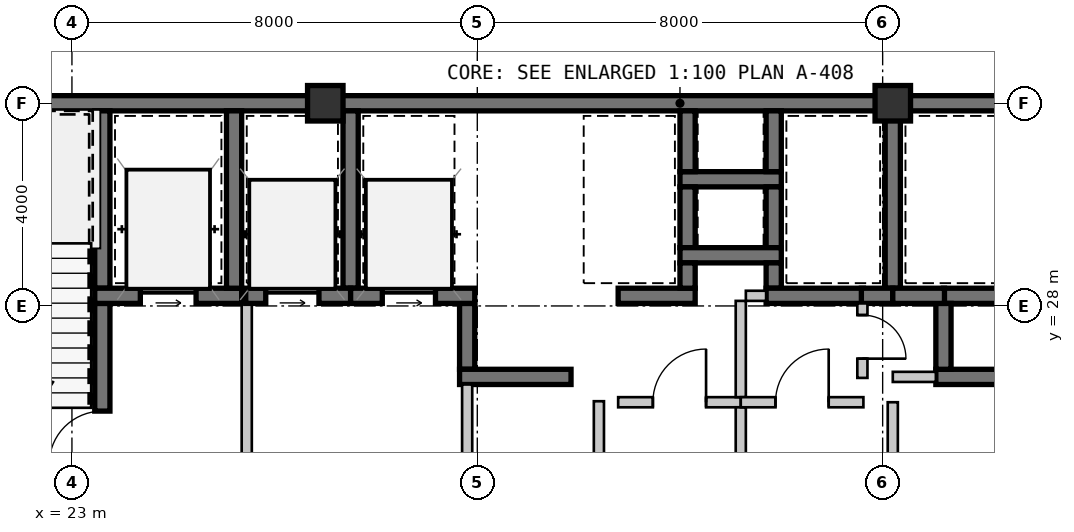
"""IFC4 building model, lengths in metres.
Left out: names, types, materials, properties, quantities, classifications, styles, units other than length and angle.
Written with IfcOpenShell. Run it as: python <this file> out.ifc"""

import sys

from ifc_helpers import new_model, si_unit, direction, frame, frame_2d, origin, origin_2d, place, context, subcontext, project, spatial, rectangle, extrude, source, transform, mapped, element, fill, save


model = new_model("IFC4")
c1 = context("Model", 3, precision=1e-05, world=origin(), true_north=direction((0.0, 1.0)))
c2 = subcontext(c1, "Body", "Model", "MODEL_VIEW")
j1 = project(units=[si_unit("LENGTHUNIT", "METRE"), si_unit("PLANEANGLEUNIT", "RADIAN")], contexts=[c1])
p1 = place(None, origin())
s1 = spatial("IfcSite", under=j1, at=p1, CompositionType="ELEMENT")
p2 = place(p1, origin())
s2 = spatial("IfcBuilding", under=s1, at=p2, CompositionType="ELEMENT")
p3 = place(p2, frame((0.0, 0.0, 65.1)))
s3 = spatial("IfcBuildingStorey", under=s2, at=p3, CompositionType="ELEMENT", Elevation=65.1)
m1 = source(origin(), c2, "Body", "SweptSolid", [
    extrude(rectangle(XDim=0.7, YDim=0.7, at=origin_2d()), origin(), (0.0, 0.0, 1.0), 3.15),
])
for number, where, z_axis, x_axis in (
    (1, (28.0, 32.0, 0.0), (0.0, 0.0, 1.0), (1.0, 0.0, 0.0)),
    (2, (39.2, 32.0, 0.0), (0.0, 0.0, 1.0), (1.0, 0.0, 0.0)),
):
    element("IfcColumn", number, at=place(p3, frame(where, z_axis=z_axis, x_axis=x_axis)), inside=s3, PredefinedType="COLUMN", context=c2, shape_type="MappedRepresentation", body=[
        mapped(m1, transform((0.0, 0.0, 0.0), scale=1.0)),
    ])
m2 = source(origin(), c2, "Body", "SweptSolid", [
    extrude(rectangle(XDim=9.15, YDim=0.3, at=frame_2d((4.575, 0.0))), origin(), (0.0, 0.0, 1.0), 2.93),
])
p4 = place(p3, frame((18.85, 32.0, 0.0), z_axis=(0.0, 0.0, 1.0), x_axis=(1.0, 0.0, 0.0)))
e3 = element("IfcWall", 3, at=p4, inside=s3, PredefinedType="SHEAR", context=c2, shape_type="MappedRepresentation", body=[
    mapped(m2, transform((0.0, 0.0, 0.0), scale=1.0)),
])
m3 = source(origin(), c2, "Body", "SweptSolid", [
    extrude(rectangle(XDim=11.2, YDim=0.3, at=frame_2d((5.6, 0.0))), origin(), (0.0, 0.0, 1.0), 2.93),
])
p5 = place(p3, frame((28.0, 32.0, 0.0), z_axis=(0.0, 0.0, 1.0), x_axis=(1.0, 0.0, 0.0)))
e4 = element("IfcWall", 4, at=p5, inside=s3, PredefinedType="SHEAR", context=c2, shape_type="MappedRepresentation", body=[
    mapped(m3, transform((0.0, 0.0, 0.0), scale=1.0)),
])
m4 = source(origin(), c2, "Body", "SweptSolid", [
    extrude(rectangle(XDim=11.95, YDim=0.3, at=frame_2d((5.975, 0.0))), origin(), (0.0, 0.0, 1.0), 2.93),
])
p6 = place(p3, frame((39.2, 32.0, 0.0), z_axis=(0.0, 0.0, 1.0), x_axis=(1.0, 0.0, 0.0)))
e5 = element("IfcWall", 5, at=p6, inside=s3, PredefinedType="SHEAR", context=c2, shape_type="MappedRepresentation", body=[
    mapped(m4, transform((0.0, 0.0, 0.0), scale=1.0)),
])
m5 = source(origin(), c2, "Body", "SweptSolid", [
    extrude(rectangle(XDim=3.5, YDim=0.3, at=frame_2d((1.75, 0.0))), origin(), (0.0, 0.0, 1.0), 2.93),
])
p7 = place(p3, frame((23.6, 28.35, 0.0), z_axis=(0.0, 0.0, 1.0), x_axis=(0.0, 1.0, 0.0)))
e6 = element("IfcWall", 6, at=p7, inside=s3, PredefinedType="SHEAR", context=c2, shape_type="MappedRepresentation", body=[
    mapped(m5, transform((0.0, 0.0, 0.0), scale=1.0)),
])
m6 = source(origin(), c2, "Body", "SweptSolid", [
    extrude(rectangle(XDim=3.9, YDim=0.3, at=frame_2d((1.95, 0.0))), origin(), (0.0, 0.0, 1.0), 2.93),
])
p8 = place(p3, frame((23.6, 24.15, 0.0), z_axis=(0.0, 0.0, 1.0), x_axis=(0.0, 1.0, 0.0)))
e7 = element("IfcWall", 7, at=p8, inside=s3, PredefinedType="SHEAR", context=c2, shape_type="MappedRepresentation", body=[
    mapped(m6, transform((0.0, 0.0, 0.0), scale=1.0)),
])
m7 = source(origin(), c2, "Body", "SweptSolid", [
    extrude(rectangle(XDim=1.05, YDim=2.1, at=frame_2d((0.525, 1.05))), frame((0.0, 0.16, 0.0), z_axis=(0.0, -1.0, 0.0), x_axis=(1.0, 0.0, 0.0)), (0.0, 0.0, 1.0), 0.32),
])
p9 = place(p8, frame((0.725, 0.0, 0.0)))
e8 = element("IfcOpeningElement", 8, at=p9, cuts=e7, PredefinedType="OPENING", context=c2, shape_type="MappedRepresentation", body=[
    mapped(m7, transform((0.0, 0.0, 0.0), scale=1.0)),
])
m8 = source(origin(), c2, "Body", "SweptSolid", [
    extrude(rectangle(XDim=2.9, YDim=0.3, at=frame_2d((1.45, 0.0))), origin(), (0.0, 0.0, 1.0), 2.93),
])
p10 = place(p3, frame((23.45, 28.2, 0.0), z_axis=(0.0, 0.0, 1.0), x_axis=(1.0, 0.0, 0.0)))
e9 = element("IfcWall", 9, at=p10, inside=s3, PredefinedType="SHEAR", context=c2, shape_type="MappedRepresentation", body=[
    mapped(m8, transform((0.0, 0.0, 0.0), scale=1.0)),
])
m9 = source(origin(), c2, "Body", "SweptSolid", [
    extrude(rectangle(XDim=1.1, YDim=2.15, at=frame_2d((0.55, 1.075))), frame((0.0, 0.16, 0.0), z_axis=(0.0, -1.0, 0.0), x_axis=(1.0, 0.0, 0.0)), (0.0, 0.0, 1.0), 0.32),
])
p11 = place(p10, frame((0.9, 0.0, 0.0)))
e10 = element("IfcOpeningElement", 10, at=p11, cuts=e9, PredefinedType="OPENING", context=c2, shape_type="MappedRepresentation", body=[
    mapped(m9, transform((0.0, 0.0, 0.0), scale=1.0)),
])
p12 = place(p3, frame((26.2, 28.35, 0.0), z_axis=(0.0, 0.0, 1.0), x_axis=(0.0, 1.0, 0.0)))
e11 = element("IfcWall", 11, at=p12, inside=s3, PredefinedType="SHEAR", context=c2, shape_type="MappedRepresentation", body=[
    mapped(m5, transform((0.0, 0.0, 0.0), scale=1.0)),
])
m10 = source(origin(), c2, "Body", "SweptSolid", [
    extrude(rectangle(XDim=3.95, YDim=0.2, at=frame_2d((1.975, 0.0))), origin(), (0.0, 0.0, 1.0), 2.93),
])
p13 = place(p3, frame((26.45, 24.1, 0.0), z_axis=(0.0, 0.0, 1.0), x_axis=(0.0, 1.0, 0.0)))
e12 = element("IfcWall", 12, at=p13, inside=s3, PredefinedType="SOLIDWALL", context=c2, shape_type="MappedRepresentation", body=[
    mapped(m10, transform((0.0, 0.0, 0.0), scale=1.0)),
])
m11 = source(origin(), c2, "Body", "SweptSolid", [
    extrude(rectangle(XDim=2.0, YDim=0.3, at=frame_2d((1.0, 0.0))), origin(), (0.0, 0.0, 1.0), 2.93),
])
p14 = place(p3, frame((35.0, 30.5, 0.0), z_axis=(0.0, 0.0, 1.0), x_axis=(1.0, 0.0, 0.0)))
e13 = element("IfcWall", 13, at=p14, inside=s3, PredefinedType="SHEAR", context=c2, shape_type="MappedRepresentation", body=[
    mapped(m11, transform((0.0, 0.0, 0.0), scale=1.0)),
])
m12 = source(origin(), c2, "Body", "SweptSolid", [
    extrude(rectangle(XDim=1.2, YDim=0.3, at=frame_2d((0.6, 0.0))), origin(), (0.0, 0.0, 1.0), 2.93),
])
for number, where, z_axis, x_axis in (
    (14, (35.15, 31.85, 0.0), (0.0, 0.0, 1.0), (0.0, -1.0, 0.0)),
    (15, (36.85, 30.65, 0.0), (0.0, 0.0, 1.0), (0.0, 1.0, 0.0)),
    (16, (35.15, 30.35, 0.0), (0.0, 0.0, 1.0), (0.0, -1.0, 0.0)),
    (17, (36.85, 29.15, 0.0), (0.0, 0.0, 1.0), (0.0, 1.0, 0.0)),
):
    element("IfcWall", number, at=place(p3, frame(where, z_axis=z_axis, x_axis=x_axis)), inside=s3, PredefinedType="SHEAR", context=c2, shape_type="MappedRepresentation", body=[
        mapped(m12, transform((0.0, 0.0, 0.0), scale=1.0)),
    ])
p15 = place(p3, frame((35.0, 29.0, 0.0), z_axis=(0.0, 0.0, 1.0), x_axis=(1.0, 0.0, 0.0)))
e18 = element("IfcWall", 18, at=p15, inside=s3, PredefinedType="SHEAR", context=c2, shape_type="MappedRepresentation", body=[
    mapped(m11, transform((0.0, 0.0, 0.0), scale=1.0)),
])
m13 = source(origin(), c2, "Body", "SweptSolid", [
    extrude(rectangle(XDim=1.3, YDim=0.3, at=frame_2d((0.65, 0.0))), origin(), (0.0, 0.0, 1.0), 2.93),
])
p16 = place(p3, frame((30.8, 28.05, 0.0), z_axis=(0.0, 0.0, 1.0), x_axis=(0.0, -1.0, 0.0)))
e19 = element("IfcWall", 19, at=p16, inside=s3, PredefinedType="SHEAR", context=c2, shape_type="MappedRepresentation", body=[
    mapped(m13, transform((0.0, 0.0, 0.0), scale=1.0)),
])
m14 = source(origin(), c2, "Body", "SweptSolid", [
    extrude(rectangle(XDim=2.2, YDim=0.3, at=frame_2d((1.1, 0.0))), origin(), (0.0, 0.0, 1.0), 2.93),
])
p17 = place(p3, frame((30.65, 26.6, 0.0), z_axis=(0.0, 0.0, 1.0), x_axis=(1.0, 0.0, 0.0)))
e20 = element("IfcWall", 20, at=p17, inside=s3, PredefinedType="SHEAR", context=c2, shape_type="MappedRepresentation", body=[
    mapped(m14, transform((0.0, 0.0, 0.0), scale=1.0)),
])
m15 = source(origin(), c2, "Body", "SweptSolid", [
    extrude(rectangle(XDim=1.32, YDim=0.3, at=frame_2d((0.66, 0.0))), origin(), (0.0, 0.0, 1.0), 2.93),
])
p18 = place(p3, frame((41.52, 28.2, 0.0), z_axis=(0.0, 0.0, 1.0), x_axis=(-1.0, 0.0, 0.0)))
e21 = element("IfcWall", 21, at=p18, inside=s3, PredefinedType="SHEAR", context=c2, shape_type="MappedRepresentation", body=[
    mapped(m15, transform((0.0, 0.0, 0.0), scale=1.0)),
])
m16 = source(origin(), c2, "Body", "SweptSolid", [
    extrude(rectangle(XDim=1.47, YDim=0.3, at=frame_2d((0.735, 0.0))), origin(), (0.0, 0.0, 1.0), 2.93),
])
p19 = place(p3, frame((40.05, 26.6, 0.0), z_axis=(0.0, 0.0, 1.0), x_axis=(1.0, 0.0, 0.0)))
e22 = element("IfcWall", 22, at=p19, inside=s3, PredefinedType="SHEAR", context=c2, shape_type="MappedRepresentation", body=[
    mapped(m16, transform((0.0, 0.0, 0.0), scale=1.0)),
])
p20 = place(p3, frame((40.2, 28.05, 0.0), z_axis=(0.0, 0.0, 1.0), x_axis=(0.0, -1.0, 0.0)))
e23 = element("IfcWall", 23, at=p20, inside=s3, PredefinedType="SHEAR", context=c2, shape_type="MappedRepresentation", body=[
    mapped(m13, transform((0.0, 0.0, 0.0), scale=1.0)),
])
p21 = place(p3, frame((28.5, 28.35, 0.0), z_axis=(0.0, 0.0, 1.0), x_axis=(0.0, 1.0, 0.0)))
e24 = element("IfcWall", 24, at=p21, inside=s3, PredefinedType="SHEAR", context=c2, shape_type="MappedRepresentation", body=[
    mapped(m5, transform((0.0, 0.0, 0.0), scale=1.0)),
])
m17 = source(origin(), c2, "Body", "SweptSolid", [
    extrude(rectangle(XDim=2.07, YDim=0.3, at=frame_2d((1.035, 0.0))), origin(), (0.0, 0.0, 1.0), 2.93),
])
p22 = place(p3, frame((26.43, 28.2, 0.0), z_axis=(0.0, 0.0, 1.0), x_axis=(1.0, 0.0, 0.0)))
e25 = element("IfcWall", 25, at=p22, inside=s3, PredefinedType="SHEAR", context=c2, shape_type="MappedRepresentation", body=[
    mapped(m17, transform((0.0, 0.0, 0.0), scale=1.0)),
])
m18 = source(origin(), c2, "Body", "SweptSolid", [
    extrude(rectangle(XDim=1.05, YDim=2.15, at=frame_2d((0.525, 1.075))), frame((0.0, 0.16, 0.0), z_axis=(0.0, -1.0, 0.0), x_axis=(1.0, 0.0, 0.0)), (0.0, 0.0, 1.0), 0.32),
])
p23 = place(p22, frame((0.395, 0.0, 0.0)))
e26 = element("IfcOpeningElement", 26, at=p23, cuts=e25, PredefinedType="OPENING", context=c2, shape_type="MappedRepresentation", body=[
    mapped(m18, transform((0.0, 0.0, 0.0), scale=1.0)),
])
m19 = source(origin(), c2, "Body", "SweptSolid", [
    extrude(rectangle(XDim=2.45, YDim=0.3, at=frame_2d((1.225, 0.0))), origin(), (0.0, 0.0, 1.0), 2.93),
])
p24 = place(p3, frame((28.5, 28.2, 0.0), z_axis=(0.0, 0.0, 1.0), x_axis=(1.0, 0.0, 0.0)))
e27 = element("IfcWall", 27, at=p24, inside=s3, PredefinedType="SHEAR", context=c2, shape_type="MappedRepresentation", body=[
    mapped(m19, transform((0.0, 0.0, 0.0), scale=1.0)),
])
p25 = place(p24, frame((0.625, 0.0, 0.0)))
e28 = element("IfcOpeningElement", 28, at=p25, cuts=e27, PredefinedType="OPENING", context=c2, shape_type="MappedRepresentation", body=[
    mapped(m18, transform((0.0, 0.0, 0.0), scale=1.0)),
])
m20 = source(origin(), c2, "Body", "SweptSolid", [
    extrude(rectangle(XDim=2.35, YDim=0.2, at=frame_2d((1.175, 0.0))), origin(), (0.0, 0.0, 1.0), 2.93),
])
p26 = place(p3, frame((30.8, 26.45, 0.0), z_axis=(0.0, 0.0, 1.0), x_axis=(0.0, -1.0, 0.0)))
e29 = element("IfcWall", 29, at=p26, inside=s3, PredefinedType="SOLIDWALL", context=c2, shape_type="MappedRepresentation", body=[
    mapped(m20, transform((0.0, 0.0, 0.0), scale=1.0)),
])
m21 = source(origin(), c2, "Body", "SweptSolid", [
    extrude(rectangle(XDim=1.52, YDim=0.3, at=frame_2d((0.76, 0.0))), origin(), (0.0, 0.0, 1.0), 2.93),
])
p27 = place(p3, frame((33.78, 28.2, 0.0), z_axis=(0.0, 0.0, 1.0), x_axis=(1.0, 0.0, 0.0)))
e30 = element("IfcWall", 30, at=p27, inside=s3, PredefinedType="SHEAR", context=c2, shape_type="MappedRepresentation", body=[
    mapped(m21, transform((0.0, 0.0, 0.0), scale=1.0)),
])
m22 = source(origin(), c2, "Body", "SweptSolid", [
    extrude(rectangle(XDim=0.5, YDim=0.3, at=frame_2d((0.25, 0.0))), origin(), (0.0, 0.0, 1.0), 2.93),
])
p28 = place(p3, frame((35.15, 28.35, 0.0), z_axis=(0.0, 0.0, 1.0), x_axis=(0.0, 1.0, 0.0)))
e31 = element("IfcWall", 31, at=p28, inside=s3, PredefinedType="SHEAR", context=c2, shape_type="MappedRepresentation", body=[
    mapped(m22, transform((0.0, 0.0, 0.0), scale=1.0)),
])
p29 = place(p3, frame((39.2, 28.35, 0.0), z_axis=(0.0, 0.0, 1.0), x_axis=(0.0, 1.0, 0.0)))
e32 = element("IfcWall", 32, at=p29, inside=s3, PredefinedType="SHEAR", context=c2, shape_type="MappedRepresentation", body=[
    mapped(m5, transform((0.0, 0.0, 0.0), scale=1.0)),
])
p30 = place(p3, frame((36.85, 28.85, 0.0), z_axis=(0.0, 0.0, 1.0), x_axis=(0.0, -1.0, 0.0)))
e33 = element("IfcWall", 33, at=p30, inside=s3, PredefinedType="SHEAR", context=c2, shape_type="MappedRepresentation", body=[
    mapped(m22, transform((0.0, 0.0, 0.0), scale=1.0)),
])
m23 = source(origin(), c2, "Body", "SweptSolid", [
    extrude(rectangle(XDim=1.92, YDim=0.3, at=frame_2d((0.96, 0.0))), origin(), (0.0, 0.0, 1.0), 2.93),
])
p31 = place(p3, frame((36.7, 28.2, 0.0), z_axis=(0.0, 0.0, 1.0), x_axis=(1.0, 0.0, 0.0)))
e34 = element("IfcWall", 34, at=p31, inside=s3, PredefinedType="SHEAR", context=c2, shape_type="MappedRepresentation", body=[
    mapped(m23, transform((0.0, 0.0, 0.0), scale=1.0)),
])
m24 = source(origin(), c2, "Body", "SweptSolid", [
    extrude(rectangle(XDim=0.62, YDim=0.3, at=frame_2d((0.31, 0.0))), origin(), (0.0, 0.0, 1.0), 2.93),
])
p32 = place(p3, frame((38.58, 28.2, 0.0), z_axis=(0.0, 0.0, 1.0), x_axis=(1.0, 0.0, 0.0)))
e35 = element("IfcWall", 35, at=p32, inside=s3, PredefinedType="SHEAR", context=c2, shape_type="MappedRepresentation", body=[
    mapped(m24, transform((0.0, 0.0, 0.0), scale=1.0)),
])
m25 = source(origin(), c2, "Body", "SweptSolid", [
    extrude(rectangle(XDim=1.02, YDim=0.3, at=frame_2d((0.51, 0.0))), origin(), (0.0, 0.0, 1.0), 2.93),
])
p33 = place(p3, frame((39.2, 28.2, 0.0), z_axis=(0.0, 0.0, 1.0), x_axis=(1.0, 0.0, 0.0)))
e36 = element("IfcWall", 36, at=p33, inside=s3, PredefinedType="SHEAR", context=c2, shape_type="MappedRepresentation", body=[
    mapped(m25, transform((0.0, 0.0, 0.0), scale=1.0)),
])
m26 = source(origin(), c2, "Body", "SweptSolid", [
    extrude(rectangle(XDim=2.02, YDim=0.2, at=frame_2d((1.01, 0.0))), origin(), (0.0, 0.0, 1.0), 2.93),
])
p34 = place(p3, frame((33.4, 26.12, 0.0), z_axis=(0.0, 0.0, 1.0), x_axis=(0.0, -1.0, 0.0)))
e37 = element("IfcWall", 37, at=p34, inside=s3, PredefinedType="SOLIDWALL", context=c2, shape_type="MappedRepresentation", body=[
    mapped(m26, transform((0.0, 0.0, 0.0), scale=1.0)),
])
m27 = source(origin(), c2, "Body", "SweptSolid", [
    extrude(rectangle(XDim=2.42, YDim=0.2, at=frame_2d((1.21, 0.0))), origin(), (0.0, 0.0, 1.0), 2.93),
])
p35 = place(p3, frame((33.78, 26.1, 0.0), z_axis=(0.0, 0.0, 1.0), x_axis=(1.0, 0.0, 0.0)))
e38 = element("IfcWall", 38, at=p35, inside=s3, PredefinedType="SOLIDWALL", context=c2, shape_type="MappedRepresentation", body=[
    mapped(m27, transform((0.0, 0.0, 0.0), scale=1.0)),
])
m28 = source(origin(), c2, "Body", "SweptSolid", [
    extrude(rectangle(XDim=1.05, YDim=2.1, at=frame_2d((0.525, 1.05))), frame((0.0, 0.11, 0.0), z_axis=(0.0, -1.0, 0.0), x_axis=(1.0, 0.0, 0.0)), (0.0, 0.0, 1.0), 0.22),
])
p36 = place(p35, frame((0.685, 0.0, 0.0)))
e39 = element("IfcOpeningElement", 39, at=p36, cuts=e38, PredefinedType="OPENING", context=c2, shape_type="MappedRepresentation", body=[
    mapped(m28, transform((0.0, 0.0, 0.0), scale=1.0)),
])
m29 = source(origin(), c2, "Body", "SweptSolid", [
    extrude(rectangle(XDim=1.9, YDim=0.2, at=frame_2d((0.95, 0.0))), origin(), (0.0, 0.0, 1.0), 2.93),
])
p37 = place(p3, frame((36.2, 26.0, 0.0), z_axis=(0.0, 0.0, 1.0), x_axis=(0.0, -1.0, 0.0)))
e40 = element("IfcWall", 40, at=p37, inside=s3, PredefinedType="SOLIDWALL", context=c2, shape_type="MappedRepresentation", body=[
    mapped(m29, transform((0.0, 0.0, 0.0), scale=1.0)),
])
m30 = source(origin(), c2, "Body", "SweptSolid", [
    extrude(rectangle(XDim=1.9, YDim=0.2, at=frame_2d((0.95, 0.0))), origin(), (0.0, 0.0, 1.0), 2.93),
])
p38 = place(p3, frame((36.2, 28.1, 0.0), z_axis=(0.0, 0.0, 1.0), x_axis=(0.0, -1.0, 0.0)))
e41 = element("IfcWall", 41, at=p38, inside=s3, PredefinedType="SOLIDWALL", context=c2, shape_type="MappedRepresentation", body=[
    mapped(m30, transform((0.0, 0.0, 0.0), scale=1.0)),
])
m31 = source(origin(), c2, "Body", "SweptSolid", [
    extrude(rectangle(XDim=0.4, YDim=0.2, at=frame_2d((0.2, 0.0))), origin(), (0.0, 0.0, 1.0), 2.93),
])
p39 = place(p3, frame((36.7, 28.2, 0.0), z_axis=(0.0, 0.0, 1.0), x_axis=(-1.0, 0.0, 0.0)))
e42 = element("IfcWall", 42, at=p39, inside=s3, PredefinedType="SOLIDWALL", context=c2, shape_type="MappedRepresentation", body=[
    mapped(m31, transform((0.0, 0.0, 0.0), scale=1.0)),
])
m32 = source(origin(), c2, "Body", "SweptSolid", [
    extrude(rectangle(XDim=2.42, YDim=0.2, at=frame_2d((1.21, 0.0))), origin(), (0.0, 0.0, 1.0), 2.93),
])
p40 = place(p3, frame((36.2, 26.1, 0.0), z_axis=(0.0, 0.0, 1.0), x_axis=(1.0, 0.0, 0.0)))
e43 = element("IfcWall", 43, at=p40, inside=s3, PredefinedType="SOLIDWALL", context=c2, shape_type="MappedRepresentation", body=[
    mapped(m32, transform((0.0, 0.0, 0.0), scale=1.0)),
])
p41 = place(p40, frame((0.685, 0.0, 0.0)))
e44 = element("IfcOpeningElement", 44, at=p41, cuts=e43, PredefinedType="OPENING", context=c2, shape_type="MappedRepresentation", body=[
    mapped(m28, transform((0.0, 0.0, 0.0), scale=1.0)),
])
m33 = source(origin(), c2, "Body", "SweptSolid", [
    extrude(rectangle(XDim=2.0, YDim=0.2, at=frame_2d((1.0, 0.0))), origin(), (0.0, 0.0, 1.0), 2.47),
])
p42 = place(p3, frame((39.2, 26.1, 0.0), z_axis=(0.0, 0.0, 1.0), x_axis=(0.0, -1.0, 0.0)))
e45 = element("IfcWall", 45, at=p42, inside=s3, PredefinedType="SOLIDWALL", context=c2, shape_type="MappedRepresentation", body=[
    mapped(m33, transform((0.0, 0.0, 0.0), scale=1.0)),
])
m34 = source(origin(), c2, "Body", "SweptSolid", [
    extrude(rectangle(XDim=1.47, YDim=0.2, at=frame_2d((0.735, 0.0))), origin(), (0.0, 0.0, 1.0), 2.93),
])
p43 = place(p3, frame((38.6, 28.05, 0.0), z_axis=(0.0, 0.0, 1.0), x_axis=(0.0, -1.0, 0.0)))
e46 = element("IfcWall", 46, at=p43, inside=s3, PredefinedType="SOLIDWALL", context=c2, shape_type="MappedRepresentation", body=[
    mapped(m34, transform((0.0, 0.0, 0.0), scale=1.0)),
])
m35 = source(origin(), c2, "Body", "SweptSolid", [
    extrude(rectangle(XDim=0.86, YDim=2.1, at=frame_2d((0.43, 1.05))), frame((0.0, 0.11, 0.0), z_axis=(0.0, -1.0, 0.0), x_axis=(1.0, 0.0, 0.0)), (0.0, 0.0, 1.0), 0.22),
])
p44 = place(p43, frame((0.23, 0.0, 0.0)))
e47 = element("IfcOpeningElement", 47, at=p44, cuts=e46, PredefinedType="OPENING", context=c2, shape_type="MappedRepresentation", body=[
    mapped(m35, transform((0.0, 0.0, 0.0), scale=1.0)),
])
m36 = source(origin(), c2, "Body", "SweptSolid", [
    extrude(rectangle(XDim=0.85, YDim=0.2, at=frame_2d((0.425, 0.0))), origin(), (0.0, 0.0, 1.0), 2.93),
])
p45 = place(p3, frame((39.2, 26.6, 0.0), z_axis=(0.0, 0.0, 1.0), x_axis=(1.0, 0.0, 0.0)))
e48 = element("IfcWall", 48, at=p45, inside=s3, PredefinedType="SOLIDWALL", context=c2, shape_type="MappedRepresentation", body=[
    mapped(m36, transform((0.0, 0.0, 0.0), scale=1.0)),
])
m37 = source(origin(), c2, "Body", "SweptSolid", [
    extrude(rectangle(XDim=1.05, YDim=2.1, at=frame_2d((0.525, 1.05))), frame((0.0, 0.025, 0.0), z_axis=(0.0, -1.0, 0.0), x_axis=(1.0, 0.0, 0.0)), (0.0, 0.0, 1.0), 0.05),
])
p46 = place(p9, origin())
e49 = element("IfcDoor", 49, at=p46, inside=s3, OperationType="SINGLE_SWING_LEFT", PredefinedType="DOOR", context=c2, shape_type="MappedRepresentation", body=[
    mapped(m37, transform((0.0, 0.0, 0.0), scale=1.0)),
])
fill(e8, e49)
m38 = source(origin(), c2, "Body", "SweptSolid", [
    extrude(rectangle(XDim=1.1, YDim=2.15, at=frame_2d((0.55, 1.075))), frame((0.0, 0.025, 0.0), z_axis=(0.0, -1.0, 0.0), x_axis=(1.0, 0.0, 0.0)), (0.0, 0.0, 1.0), 0.05),
])
p47 = place(p11, origin())
e50 = element("IfcDoor", 50, at=p47, inside=s3, OperationType="SLIDING_TO_LEFT", PredefinedType="DOOR", context=c2, shape_type="MappedRepresentation", body=[
    mapped(m38, transform((0.0, 0.0, 0.0), scale=1.0)),
])
fill(e10, e50)
m39 = source(origin(), c2, "Body", "SweptSolid", [
    extrude(rectangle(XDim=1.05, YDim=2.15, at=frame_2d((0.525, 1.075))), frame((0.0, 0.025, 0.0), z_axis=(0.0, -1.0, 0.0), x_axis=(1.0, 0.0, 0.0)), (0.0, 0.0, 1.0), 0.05),
])
p48 = place(p23, origin())
e51 = element("IfcDoor", 51, at=p48, inside=s3, OperationType="SLIDING_TO_LEFT", PredefinedType="DOOR", context=c2, shape_type="MappedRepresentation", body=[
    mapped(m39, transform((0.0, 0.0, 0.0), scale=1.0)),
])
fill(e26, e51)
p49 = place(p25, origin())
e52 = element("IfcDoor", 52, at=p49, inside=s3, OperationType="SLIDING_TO_LEFT", PredefinedType="DOOR", context=c2, shape_type="MappedRepresentation", body=[
    mapped(m39, transform((0.0, 0.0, 0.0), scale=1.0)),
])
fill(e28, e52)
p50 = place(p36, origin())
e53 = element("IfcDoor", 53, at=p50, inside=s3, OperationType="SINGLE_SWING_RIGHT", PredefinedType="DOOR", context=c2, shape_type="MappedRepresentation", body=[
    mapped(m37, transform((0.0, 0.0, 0.0), scale=1.0)),
])
fill(e39, e53)
p51 = place(p41, origin())
e54 = element("IfcDoor", 54, at=p51, inside=s3, OperationType="SINGLE_SWING_RIGHT", PredefinedType="DOOR", context=c2, shape_type="MappedRepresentation", body=[
    mapped(m37, transform((0.0, 0.0, 0.0), scale=1.0)),
])
fill(e44, e54)
m40 = source(origin(), c2, "Body", "SweptSolid", [
    extrude(rectangle(XDim=0.86, YDim=2.1, at=frame_2d((0.43, 1.05))), frame((0.0, 0.025, 0.0), z_axis=(0.0, -1.0, 0.0), x_axis=(1.0, 0.0, 0.0)), (0.0, 0.0, 1.0), 0.05),
])
p52 = place(p44, origin())
e55 = element("IfcDoor", 55, at=p52, inside=s3, OperationType="SINGLE_SWING_RIGHT", PredefinedType="DOOR", context=c2, shape_type="MappedRepresentation", body=[
    mapped(m40, transform((0.0, 0.0, 0.0), scale=1.0)),
])
fill(e47, e55)
save(model, sys.argv[1])
